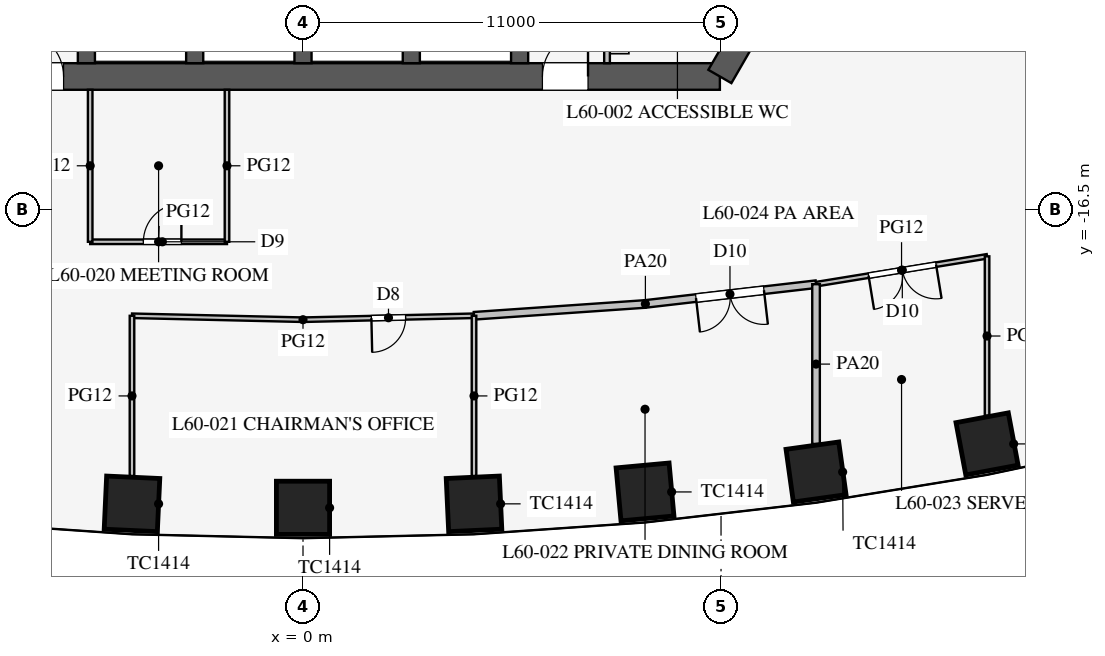
"""IFC4 building model, lengths in metres.
Left out: names, types, materials, properties, quantities, classifications, styles, units other than length and angle.
Written with IfcOpenShell. Run it as: python <this file> out.ifc"""

import sys

from ifc_helpers import new_model, si_unit, direction, frame, frame_2d, origin, origin_2d, place, context, subcontext, project, spatial, rectangle, extrude, element, fill, save


model = new_model("IFC4")
c1 = context("Model", 3, precision=1e-05, world=origin(), true_north=direction((0.0, 1.0)))
c2 = subcontext(c1, "Body", "Model", "MODEL_VIEW")
j1 = project(units=[si_unit("LENGTHUNIT", "METRE"), si_unit("PLANEANGLEUNIT", "RADIAN")], contexts=[c1])
p1 = place(None, origin())
s1 = spatial("IfcSite", under=j1, at=p1, CompositionType="ELEMENT")
p2 = place(p1, origin())
s2 = spatial("IfcBuilding", under=s1, at=p2, CompositionType="ELEMENT")
p3 = place(p2, frame((0.0, 0.0, 261.1)))
s3 = spatial("IfcBuildingStorey", under=s2, at=p3, CompositionType="ELEMENT", Elevation=261.1)
for number, where, z_axis, x_axis in (
    (1, (-4.5, -24.246, 0.0), (0.0, 0.0, 1.0), (0.999, -0.046, 0.0)),
    (2, (0.0, -24.351, 0.0), (0.0, 0.0, 1.0), (1.0, 0.0, 0.0)),
    (3, (4.5, -24.246, 0.0), (0.0, 0.0, 1.0), (0.999, 0.046, 0.0)),
    (4, (9.0, -23.933, 0.0), (0.0, 0.0, 1.0), (0.996, 0.092, 0.0)),
    (5, (13.5, -23.408, 0.0), (0.0, 0.0, 1.0), (0.99, 0.138, 0.0)),
    (6, (18.0, -22.669, 0.0), (0.0, 0.0, 1.0), (0.983, 0.184, 0.0)),
):
    element("IfcColumn", number, at=place(p3, frame(where, z_axis=z_axis, x_axis=x_axis)), inside=s3, PredefinedType="COLUMN", context=c2, shape_type="SweptSolid", body=[
        extrude(rectangle(XDim=1.4, YDim=1.4, at=origin_2d()), origin(), (0.0, 0.0, 1.0), 4.2),
    ])
p4 = place(p3, frame((-10.97, -13.0, 0.0), z_axis=(0.0, 0.0, 1.0), x_axis=(1.0, 0.0, 0.0)))
e7 = element("IfcWall", 7, at=p4, inside=s3, PredefinedType="SHEAR", context=c2, shape_type="SweptSolid", body=[
    extrude(rectangle(XDim=21.939, YDim=0.7, at=frame_2d((10.97, 0.0))), origin(), (0.0, 0.0, 1.0), 4.2),
])
p5 = place(p4, frame((17.27, 0.0, 0.0)))
e8 = element("IfcOpeningElement", 8, at=p5, cuts=e7, PredefinedType="OPENING", context=c2, shape_type="SweptSolid", body=[
    extrude(rectangle(XDim=1.2, YDim=2.1, at=frame_2d((0.6, 1.05))), frame((0.0, 0.36, 0.0), z_axis=(0.0, -1.0, 0.0), x_axis=(1.0, 0.0, 0.0)), (0.0, 0.0, 1.0), 0.72),
])
p6 = place(p4, frame((3.47, 0.0, 0.0)))
e9 = element("IfcOpeningElement", 9, at=p6, cuts=e7, PredefinedType="OPENING", context=c2, shape_type="SweptSolid", body=[
    extrude(rectangle(XDim=1.2, YDim=2.1, at=frame_2d((0.6, 1.05))), frame((0.0, 0.36, 0.0), z_axis=(0.0, -1.0, 0.0), x_axis=(1.0, 0.0, 0.0)), (0.0, 0.0, 1.0), 0.72),
])
p7 = place(p3, frame((10.97, -13.0, 0.0), z_axis=(0.0, 0.0, 1.0), x_axis=(0.499995765644, 0.866027848477, 0.0)))
e10 = element("IfcWall", 10, at=p7, inside=s3, PredefinedType="SHEAR", context=c2, shape_type="SweptSolid", body=[
    extrude(rectangle(XDim=11.547, YDim=0.7, at=frame_2d((5.773, 0.0))), origin(), (0.0, 0.0, 1.0), 4.2),
])
for number, where, z_axis, x_axis in (
    (11, (-5.7, -10.025, 0.0), (0.0, 0.0, 1.0), (0.0, -1.0, 0.0)),
    (12, (-2.85, -10.025, 0.0), (0.0, 0.0, 1.0), (0.0, -1.0, 0.0)),
    (13, (0.0, -10.025, 0.0), (0.0, 0.0, 1.0), (0.0, -1.0, 0.0)),
    (14, (2.85, -10.025, 0.0), (0.0, 0.0, 1.0), (0.0, -1.0, 0.0)),
    (15, (5.7, -10.025, 0.0), (0.0, 0.0, 1.0), (0.0, -1.0, 0.0)),
):
    element("IfcWall", number, at=place(p3, frame(where, z_axis=z_axis, x_axis=x_axis)), inside=s3, PredefinedType="SHEAR", context=c2, shape_type="SweptSolid", body=[
        extrude(rectangle(XDim=2.625, YDim=0.45, at=frame_2d((1.312, 0.0))), origin(), (0.0, 0.0, 1.0), 4.2),
    ])
p8 = place(p3, frame((8.0, -7.5, 0.0), z_axis=(0.0, 0.0, 1.0), x_axis=(0.0, -1.0, 0.0)))
e16 = element("IfcWall", 16, at=p8, inside=s3, PredefinedType="PARTITIONING", context=c2, shape_type="SweptSolid", body=[
    extrude(rectangle(XDim=5.15, YDim=0.15, at=frame_2d((2.575, 0.0))), origin(), (0.0, 0.0, 1.0), 3.95),
])
p9 = place(p8, frame((2.6, 0.0, 0.0)))
e17 = element("IfcOpeningElement", 17, at=p9, cuts=e16, PredefinedType="OPENING", context=c2, shape_type="SweptSolid", body=[
    extrude(rectangle(XDim=0.9, YDim=2.1, at=frame_2d((0.45, 1.05))), frame((0.0, 0.085, 0.0), z_axis=(0.0, -1.0, 0.0), x_axis=(1.0, 0.0, 0.0)), (0.0, 0.0, 1.0), 0.17),
])
p10 = place(p3, frame((14.159, -8.175, 0.0), z_axis=(0.0, 0.0, 1.0), x_axis=(0.866027028085, -0.499997186618, 0.0)))
e18 = element("IfcWall", 18, at=p10, inside=s3, PredefinedType="PARTITIONING", context=c2, shape_type="SweptSolid", body=[
    extrude(rectangle(XDim=15.0, YDim=0.15, at=frame_2d((7.5, 0.0))), origin(), (0.0, 0.0, 1.0), 1.95),
])
p11 = place(p3, frame((-5.6, -17.35, 0.0), z_axis=(0.0, 0.0, 1.0), x_axis=(1.0, 0.0, 0.0)))
e19 = element("IfcWall", 19, at=p11, inside=s3, PredefinedType="PARTITIONING", context=c2, shape_type="SweptSolid", body=[
    extrude(rectangle(XDim=3.6, YDim=0.12, at=frame_2d((1.8, 0.0))), origin(), (0.0, 0.0, 1.0), 2.9),
])
p12 = place(p11, frame((1.4, 0.0, 0.15)))
e20 = element("IfcOpeningElement", 20, at=p12, cuts=e19, PredefinedType="OPENING", context=c2, shape_type="SweptSolid", body=[
    extrude(rectangle(XDim=1.0, YDim=2.1, at=frame_2d((0.5, 1.05))), frame((0.0, 0.07, 0.0), z_axis=(0.0, -1.0, 0.0), x_axis=(1.0, 0.0, 0.0)), (0.0, 0.0, 1.0), 0.14),
])
for number, where, z_axis, x_axis in (
    (21, (-2.0, -13.35, 0.0), (0.0, 0.0, 1.0), (0.0, -1.0, 0.0)),
    (22, (-5.6, -13.35, 0.0), (0.0, 0.0, 1.0), (0.0, -1.0, 0.0)),
):
    element("IfcWall", number, at=place(p3, frame(where, z_axis=z_axis, x_axis=x_axis)), inside=s3, PredefinedType="PARTITIONING", context=c2, shape_type="SweptSolid", body=[
        extrude(rectangle(XDim=4.0, YDim=0.12, at=frame_2d((2.0, 0.0))), origin(), (0.0, 0.0, 1.0), 2.9),
    ])
p13 = place(p3, frame((0.0, -19.401, 0.0), z_axis=(0.0, 0.0, 1.0), x_axis=(0.99973552509, 0.022997388381, 0.0)))
e23 = element("IfcWall", 23, at=p13, inside=s3, PredefinedType="PARTITIONING", context=c2, shape_type="SweptSolid", body=[
    extrude(rectangle(XDim=4.501, YDim=0.12, at=frame_2d((2.25, 0.0))), origin(), (0.0, 0.0, 1.0), 2.9),
])
p14 = place(p13, frame((1.8, 0.0, 0.15)))
e24 = element("IfcOpeningElement", 24, at=p14, cuts=e23, PredefinedType="OPENING", context=c2, shape_type="SweptSolid", body=[
    extrude(rectangle(XDim=0.9, YDim=2.1, at=frame_2d((0.45, 1.05))), frame((0.0, 0.07, 0.0), z_axis=(0.0, -1.0, 0.0), x_axis=(1.0, 0.0, 0.0)), (0.0, 0.0, 1.0), 0.14),
])
p15 = place(p3, frame((13.5, -18.466, 0.0), z_axis=(0.0, 0.0, 1.0), x_axis=(0.986986525477, 0.160802980469, 0.0)))
e25 = element("IfcWall", 25, at=p15, inside=s3, PredefinedType="PARTITIONING", context=c2, shape_type="SweptSolid", body=[
    extrude(rectangle(XDim=4.559, YDim=0.12, at=frame_2d((2.28, 0.0))), origin(), (0.0, 0.0, 1.0), 2.9),
])
p16 = place(p15, frame((1.4, 0.0, 0.15)))
e26 = element("IfcOpeningElement", 26, at=p16, cuts=e25, PredefinedType="OPENING", context=c2, shape_type="SweptSolid", body=[
    extrude(rectangle(XDim=1.8, YDim=2.1, at=frame_2d((0.9, 1.05))), frame((0.0, 0.07, 0.0), z_axis=(0.0, -1.0, 0.0), x_axis=(1.0, 0.0, 0.0)), (0.0, 0.0, 1.0), 0.14),
])
p17 = place(p3, frame((4.5, -19.297, 0.0), z_axis=(0.0, 0.0, 1.0), x_axis=(0.997623533978, 0.068900540297, 0.0)))
e27 = element("IfcWall", 27, at=p17, inside=s3, PredefinedType="PARTITIONING", context=c2, shape_type="SweptSolid", body=[
    extrude(rectangle(XDim=4.511, YDim=0.2, at=frame_2d((2.255, 0.0))), origin(), (0.0, 0.0, 1.0), 2.9),
])
p18 = place(p3, frame((9.0, -18.986, 0.0), z_axis=(0.0, 0.0, 1.0), x_axis=(0.993382946625, 0.114849124309, 0.0)))
e28 = element("IfcWall", 28, at=p18, inside=s3, PredefinedType="PARTITIONING", context=c2, shape_type="SweptSolid", body=[
    extrude(rectangle(XDim=4.53, YDim=0.2, at=frame_2d((2.265, 0.0))), origin(), (0.0, 0.0, 1.0), 2.9),
])
p19 = place(p18, frame((1.35, 0.0, 0.15)))
e29 = element("IfcOpeningElement", 29, at=p19, cuts=e28, PredefinedType="OPENING", context=c2, shape_type="SweptSolid", body=[
    extrude(rectangle(XDim=1.8, YDim=2.1, at=frame_2d((0.9, 1.05))), frame((0.0, 0.11, 0.0), z_axis=(0.0, -1.0, 0.0), x_axis=(1.0, 0.0, 0.0)), (0.0, 0.0, 1.0), 0.22),
])
p20 = place(p3, frame((-4.5, -19.297, 0.0), z_axis=(0.0, 0.0, 1.0), x_axis=(0.99973552509, -0.022997388381, 0.0)))
e30 = element("IfcWall", 30, at=p20, inside=s3, PredefinedType="PARTITIONING", context=c2, shape_type="SweptSolid", body=[
    extrude(rectangle(XDim=4.501, YDim=0.12, at=frame_2d((2.25, 0.0))), origin(), (0.0, 0.0, 1.0), 2.9),
])
p21 = place(p3, frame((13.5, -18.466, 0.0), z_axis=(0.0, 0.0, 1.0), x_axis=(0.0, -1.0, 0.0)))
e31 = element("IfcWall", 31, at=p21, inside=s3, PredefinedType="PARTITIONING", context=c2, shape_type="SweptSolid", body=[
    extrude(rectangle(XDim=4.205, YDim=0.2, at=frame_2d((2.103, 0.0))), origin(), (0.0, 0.0, 1.0), 2.15),
])
p22 = place(p3, frame((18.0, -17.733, 0.0), z_axis=(0.0, 0.0, 1.0), x_axis=(0.0, -1.0, 0.0)))
e32 = element("IfcWall", 32, at=p22, inside=s3, PredefinedType="PARTITIONING", context=c2, shape_type="SweptSolid", body=[
    extrude(rectangle(XDim=4.194, YDim=0.12, at=frame_2d((2.097, 0.0))), origin(), (0.0, 0.0, 1.0), 2.15),
])
for number, where, z_axis, x_axis in (
    (33, (4.5, -19.297, 0.0), (0.0, 0.0, 1.0), (0.0, -1.0, 0.0)),
    (34, (-4.5, -19.297, 0.0), (0.0, 0.0, 1.0), (0.0, -1.0, 0.0)),
):
    element("IfcWall", number, at=place(p3, frame(where, z_axis=z_axis, x_axis=x_axis)), inside=s3, PredefinedType="PARTITIONING", context=c2, shape_type="SweptSolid", body=[
        extrude(rectangle(XDim=4.219, YDim=0.12, at=frame_2d((2.109, 0.0))), origin(), (0.0, 0.0, 1.0), 2.35),
    ])
p23 = place(p5, origin())
e35 = element("IfcDoor", 35, at=p23, inside=s3, OperationType="SINGLE_SWING_RIGHT", PredefinedType="DOOR", context=c2, shape_type="SweptSolid", body=[
    extrude(rectangle(XDim=1.2, YDim=2.1, at=frame_2d((0.6, 1.05))), frame((0.0, 0.025, 0.0), z_axis=(0.0, -1.0, 0.0), x_axis=(1.0, 0.0, 0.0)), (0.0, 0.0, 1.0), 0.05),
])
fill(e8, e35)
p24 = place(p6, origin())
e36 = element("IfcDoor", 36, at=p24, inside=s3, OperationType="SINGLE_SWING_LEFT", PredefinedType="DOOR", context=c2, shape_type="SweptSolid", body=[
    extrude(rectangle(XDim=1.2, YDim=2.1, at=frame_2d((0.6, 1.05))), frame((0.0, 0.025, 0.0), z_axis=(0.0, -1.0, 0.0), x_axis=(1.0, 0.0, 0.0)), (0.0, 0.0, 1.0), 0.05),
])
fill(e9, e36)
p25 = place(p12, origin())
e37 = element("IfcDoor", 37, at=p25, inside=s3, OperationType="SINGLE_SWING_RIGHT", PredefinedType="DOOR", context=c2, shape_type="SweptSolid", body=[
    extrude(rectangle(XDim=1.0, YDim=2.1, at=frame_2d((0.5, 1.05))), frame((0.0, 0.025, 0.0), z_axis=(0.0, -1.0, 0.0), x_axis=(1.0, 0.0, 0.0)), (0.0, 0.0, 1.0), 0.05),
])
fill(e20, e37)
p26 = place(p14, frame((0.9, 0.0, 0.0), z_axis=(0.0, 0.0, 1.0), x_axis=(-1.0, 0.0, 0.0)))
e38 = element("IfcDoor", 38, at=p26, inside=s3, OperationType="SINGLE_SWING_RIGHT", PredefinedType="DOOR", context=c2, shape_type="SweptSolid", body=[
    extrude(rectangle(XDim=0.9, YDim=2.1, at=frame_2d((0.45, 1.05))), frame((0.0, 0.025, 0.0), z_axis=(0.0, -1.0, 0.0), x_axis=(1.0, 0.0, 0.0)), (0.0, 0.0, 1.0), 0.05),
])
fill(e24, e38)
p27 = place(p19, frame((1.8, 0.0, 0.0), z_axis=(0.0, 0.0, 1.0), x_axis=(-1.0, 0.0, 0.0)))
e39 = element("IfcDoor", 39, at=p27, inside=s3, OperationType="DOUBLE_DOOR_SINGLE_SWING", PredefinedType="DOOR", context=c2, shape_type="SweptSolid", body=[
    extrude(rectangle(XDim=1.8, YDim=2.1, at=frame_2d((0.9, 1.05))), frame((0.0, 0.025, 0.0), z_axis=(0.0, -1.0, 0.0), x_axis=(1.0, 0.0, 0.0)), (0.0, 0.0, 1.0), 0.05),
])
fill(e29, e39)
p28 = place(p16, frame((1.8, 0.0, 0.0), z_axis=(0.0, 0.0, 1.0), x_axis=(-1.0, 0.0, 0.0)))
e40 = element("IfcDoor", 40, at=p28, inside=s3, OperationType="DOUBLE_DOOR_SINGLE_SWING", PredefinedType="DOOR", context=c2, shape_type="SweptSolid", body=[
    extrude(rectangle(XDim=1.8, YDim=2.1, at=frame_2d((0.9, 1.05))), frame((0.0, 0.025, 0.0), z_axis=(0.0, -1.0, 0.0), x_axis=(1.0, 0.0, 0.0)), (0.0, 0.0, 1.0), 0.05),
])
fill(e26, e40)
save(model, sys.argv[1])
